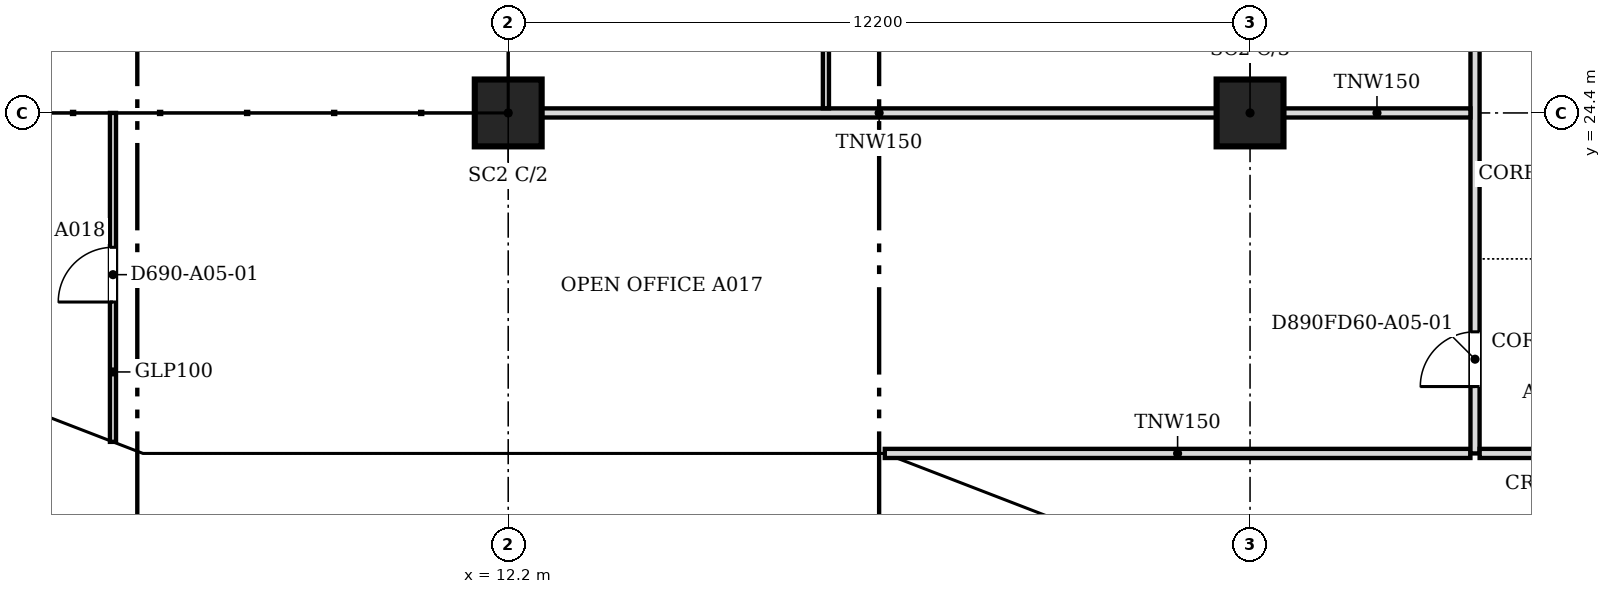
"""IFC4 building model, lengths in metres.
Left out: names, types, materials, properties, quantities, classifications, styles, units other than length and angle.
Written with IfcOpenShell. Run it as: python <this file> out.ifc"""

import sys

from ifc_helpers import new_model, si_unit, direction, frame, frame_2d, origin, origin_2d, place, context, subcontext, project, spatial, polyline, rectangle, outline, extrude, faceted_brep, source, transform, mapped, element, fill, save


model = new_model("IFC4")
c1 = context("Model", 3, precision=1e-05, world=origin(), true_north=direction((0.0, 1.0)))
c2 = subcontext(c1, "Body", "Model", "MODEL_VIEW")
j1 = project(units=[si_unit("LENGTHUNIT", "METRE"), si_unit("PLANEANGLEUNIT", "RADIAN")], contexts=[c1])
p1 = place(None, origin())
s1 = spatial("IfcSite", under=j1, at=p1, CompositionType="ELEMENT")
p2 = place(p1, origin())
s2 = spatial("IfcBuilding", under=s1, at=p2, CompositionType="ELEMENT")
p3 = place(p2, frame((0.0, 0.0, 60.0)))
s3 = spatial("IfcBuildingStorey", under=s2, at=p3, CompositionType="ELEMENT", Elevation=60.0)
for number, where, z_axis, x_axis in (
    (1, (12.2, 24.4, 0.0), (0.0, 0.0, 1.0), (1.0, 0.0, 0.0)),
    (2, (24.4, 24.4, 0.0), (0.0, 0.0, 1.0), (1.0, 0.0, 0.0)),
):
    element("IfcColumn", number, at=place(p3, frame(where, z_axis=z_axis, x_axis=x_axis)), inside=s3, PredefinedType="COLUMN", context=c2, shape_type="SweptSolid", body=[
        extrude(rectangle(XDim=1.1, YDim=1.1, at=origin_2d()), origin(), (0.0, 0.0, 1.0), 3.5),
    ])
m1 = source(origin(), c2, "Body", "Brep", [
    faceted_brep([(0.053, -0.25, 0.0), (3.003, -0.25, 3.8), (0.053, -0.25, 7.6), (0.0, -0.25, 7.532), (0.0, -0.25, 0.068), (0.106, 0.25, 7.532), (2.957, 0.25, 3.86), (2.957, 0.25, 3.74), (0.106, 0.25, 0.068), (3.003, 0.0, 3.8), (0.053, 0.0, 0.0), (0.053, 0.0, 7.6)], [[[0, 1, 2, 3, 4]], [[5, 6, 7, 8]], [[8, 7, 9, 1, 0, 10]], [[6, 5, 11, 2, 1, 9]], [[3, 2, 11]], [[10, 0, 4]], [[8, 10, 4, 3, 11, 5]], [[9, 7, 6]]]),
])
p4 = place(p3, frame((3.344, 19.631, -3.8), z_axis=(0.0, 0.0, 1.0), x_axis=(0.933007896601, -0.359855894603, 0.0)))
e3 = element("IfcWall", 3, at=p4, inside=s3, PredefinedType="SOLIDWALL", context=c2, shape_type="MappedRepresentation", body=[
    mapped(m1, transform((0.0, 0.0, 0.0), scale=1.0)),
])
m2 = source(origin(), c2, "Body", "SweptSolid", [
    extrude(outline(polyline([(0.253, 0.665), (2.687, 3.8), (0.253, 6.935), (0.253, 0.665)])), frame((0.0, 0.26, 0.0), z_axis=(0.0, -1.0, 0.0), x_axis=(1.0, 0.0, 0.0)), (0.0, 0.0, 1.0), 0.52),
])
p5 = place(p4, origin())
e4 = element("IfcOpeningElement", 4, at=p5, cuts=e3, PredefinedType="OPENING", context=c2, shape_type="MappedRepresentation", body=[
    mapped(m2, transform((0.0, 0.0, 0.0), scale=1.0)),
])
m3 = source(origin(), c2, "Body", "Brep", [
    faceted_brep([(3.003, -0.25, 0.0), (6.053, -0.25, 3.8), (3.003, -0.25, 7.6), (0.0, -0.25, 3.8), (0.047, 0.25, 3.859), (3.003, 0.25, 7.6), (6.053, 0.25, 3.8), (3.003, 0.25, 0.0), (0.047, 0.25, 3.741), (0.0, 0.0, 3.8)], [[[0, 1, 2, 3]], [[4, 5, 6, 7, 8]], [[7, 6, 1, 0]], [[6, 5, 2, 1]], [[5, 4, 9, 3, 2]], [[8, 7, 0, 3, 9]], [[8, 9, 4]]]),
])
p6 = place(p3, frame((6.146, 18.55, -3.8), z_axis=(0.0, 0.0, 1.0), x_axis=(1.0, 0.0, 0.0)))
e5 = element("IfcWall", 5, at=p6, inside=s3, PredefinedType="SOLIDWALL", context=c2, shape_type="MappedRepresentation", body=[
    mapped(m3, transform((0.0, 0.0, 0.0), scale=1.0)),
])
m4 = source(origin(), c2, "Body", "SweptSolid", [
    extrude(outline(polyline([(3.005, 0.401), (5.733, 3.8), (3.005, 7.199), (0.319, 3.8), (3.005, 0.401)])), frame((0.0, 0.26, 0.0), z_axis=(0.0, -1.0, 0.0), x_axis=(1.0, 0.0, 0.0)), (0.0, 0.0, 1.0), 0.52),
])
p7 = place(p6, origin())
e6 = element("IfcOpeningElement", 6, at=p7, cuts=e5, PredefinedType="OPENING", context=c2, shape_type="MappedRepresentation", body=[
    mapped(m4, transform((0.0, 0.0, 0.0), scale=1.0)),
])
m5 = source(origin(), c2, "Body", "Brep", [
    faceted_brep([(3.05, -0.25, 0.0), (6.1, -0.25, 3.743), (6.1, -0.25, 3.857), (3.05, -0.25, 7.6), (0.0, -0.25, 3.8), (0.0, 0.25, 3.8), (3.05, 0.25, 7.6), (6.146, 0.25, 3.8), (3.05, 0.25, 0.0), (6.146, -0.0, 3.8)], [[[0, 1, 2, 3, 4]], [[5, 6, 7, 8]], [[8, 7, 9, 1, 0]], [[7, 6, 3, 2, 9]], [[6, 5, 4, 3]], [[5, 8, 0, 4]], [[1, 9, 2]]]),
])
p8 = place(p3, frame((12.2, 18.55, -3.8), z_axis=(0.0, 0.0, 1.0), x_axis=(1.0, 0.0, 0.0)))
e7 = element("IfcWall", 7, at=p8, inside=s3, PredefinedType="SOLIDWALL", context=c2, shape_type="MappedRepresentation", body=[
    mapped(m5, transform((0.0, 0.0, 0.0), scale=1.0)),
])
m6 = source(origin(), c2, "Body", "SweptSolid", [
    extrude(outline(polyline([(3.052, 0.398), (5.824, 3.8), (3.052, 7.202), (0.321, 3.8), (3.052, 0.398)])), frame((0.0, 0.26, 0.0), z_axis=(0.0, -1.0, 0.0), x_axis=(1.0, 0.0, 0.0)), (0.0, 0.0, 1.0), 0.52),
])
p9 = place(p8, origin())
e8 = element("IfcOpeningElement", 8, at=p9, cuts=e7, PredefinedType="OPENING", context=c2, shape_type="MappedRepresentation", body=[
    mapped(m6, transform((0.0, 0.0, 0.0), scale=1.0)),
])
m7 = source(origin(), c2, "Body", "Brep", [
    faceted_brep([(3.096, -0.25, 7.536), (0.047, -0.25, 3.856), (0.047, -0.25, 3.744), (3.096, -0.25, 0.064), (0.0, 0.25, 3.8), (3.149, 0.25, 7.6), (3.202, 0.25, 7.536), (3.202, 0.25, 0.064), (3.149, 0.25, 0.0), (3.149, -0.0, 0.0), (3.149, -0.0, 7.6), (0.0, 0.0, 3.8)], [[[0, 1, 2, 3]], [[4, 5, 6, 7, 8]], [[8, 7, 9]], [[6, 5, 10]], [[5, 4, 11, 1, 0, 10]], [[4, 8, 9, 3, 2, 11]], [[11, 2, 1]], [[3, 9, 7, 6, 10, 0]]]),
])
p10 = place(p3, frame((18.346, 18.55, -3.8), z_axis=(0.0, 0.0, 1.0), x_axis=(0.932985567668, -0.359913782069, 0.0)))
e9 = element("IfcWall", 9, at=p10, inside=s3, PredefinedType="SOLIDWALL", context=c2, shape_type="MappedRepresentation", body=[
    mapped(m7, transform((0.0, 0.0, 0.0), scale=1.0)),
])
m8 = source(origin(), c2, "Body", "SweptSolid", [
    extrude(outline(polyline([(2.949, 6.967), (0.325, 3.8), (2.949, 0.633), (2.949, 6.967)])), frame((0.0, 0.26, 0.0), z_axis=(0.0, -1.0, 0.0), x_axis=(1.0, 0.0, 0.0)), (0.0, 0.0, 1.0), 0.52),
])
p11 = place(p10, origin())
e10 = element("IfcOpeningElement", 10, at=p11, cuts=e9, PredefinedType="OPENING", context=c2, shape_type="MappedRepresentation", body=[
    mapped(m8, transform((0.0, 0.0, 0.0), scale=1.0)),
])
m9 = source(origin(), c2, "Body", "Brep", [
    faceted_brep([(2.95, -0.25, 0.0), (2.997, -0.25, 0.059), (2.997, -0.25, 3.8), (0.0, -0.25, 3.8), (0.053, 0.25, 3.8), (2.904, 0.25, 3.8), (2.904, 0.25, 0.06), (0.053, 0.25, 3.732), (2.95, 0.0, 0.0), (0.0, 0.0, 3.8)], [[[0, 1, 2, 3]], [[4, 5, 6, 7]], [[1, 0, 8]], [[5, 4, 9, 3, 2]], [[7, 6, 8, 0, 3, 9]], [[7, 9, 4]], [[1, 8, 6, 5, 2]]]),
])
p12 = place(p3, frame((3.394, 19.612, 0.0), z_axis=(0.0, 0.0, 1.0), x_axis=(0.932990326376, -0.359901446078, 0.0)))
e11 = element("IfcWall", 11, at=p12, inside=s3, PredefinedType="SOLIDWALL", context=c2, shape_type="MappedRepresentation", body=[
    mapped(m9, transform((0.0, 0.0, 0.0), scale=1.0)),
])
m10 = source(origin(), c2, "Body", "SweptSolid", [
    extrude(outline(polyline([(2.75, 3.55), (0.511, 3.55), (2.75, 0.665), (2.75, 3.55)])), frame((0.0, 0.26, 0.0), z_axis=(0.0, -1.0, 0.0), x_axis=(1.0, 0.0, 0.0)), (0.0, 0.0, 1.0), 0.52),
])
p13 = place(p12, origin())
e12 = element("IfcOpeningElement", 12, at=p13, cuts=e11, PredefinedType="OPENING", context=c2, shape_type="MappedRepresentation", body=[
    mapped(m10, transform((0.0, 0.0, 0.0), scale=1.0)),
])
m11 = source(origin(), c2, "Body", "Brep", [
    faceted_brep([(0.047, -0.25, 0.0), (3.05, -0.25, 3.8), (0.0, -0.25, 3.8), (0.0, -0.25, 0.06), (0.093, 0.25, 3.8), (3.05, 0.25, 3.8), (0.093, 0.25, 0.059), (0.047, 0.0, 0.0)], [[[0, 1, 2, 3]], [[4, 5, 6]], [[6, 5, 1, 0, 7]], [[5, 4, 2, 1]], [[7, 0, 3]], [[6, 7, 3, 2, 4]]]),
])
p14 = place(p3, frame((6.1, 18.55, 0.0), z_axis=(0.0, 0.0, 1.0), x_axis=(1.0, 0.0, 0.0)))
e13 = element("IfcWall", 13, at=p14, inside=s3, PredefinedType="SOLIDWALL", context=c2, shape_type="MappedRepresentation", body=[
    mapped(m11, transform((0.0, 0.0, 0.0), scale=1.0)),
])
m12 = source(origin(), c2, "Body", "SweptSolid", [
    extrude(outline(polyline([(0.247, 0.656), (2.534, 3.55), (0.247, 3.55), (0.247, 0.656)])), frame((0.0, 0.26, 0.0), z_axis=(0.0, -1.0, 0.0), x_axis=(1.0, 0.0, 0.0)), (0.0, 0.0, 1.0), 0.52),
])
p15 = place(p14, origin())
e14 = element("IfcOpeningElement", 14, at=p15, cuts=e13, PredefinedType="OPENING", context=c2, shape_type="MappedRepresentation", body=[
    mapped(m12, transform((0.0, 0.0, 0.0), scale=1.0)),
])
m13 = source(origin(), c2, "Body", "SweptSolid", [
    extrude(outline(polyline([(3.05, 0.0), (6.1, 3.8), (0.0, 3.8), (3.05, 0.0)])), frame((0.0, 0.25, 0.0), z_axis=(0.0, -1.0, 0.0), x_axis=(1.0, 0.0, 0.0)), (0.0, 0.0, 1.0), 0.5),
])
p16 = place(p3, frame((9.15, 18.55, 0.0), z_axis=(0.0, 0.0, 1.0), x_axis=(1.0, 0.0, 0.0)))
e15 = element("IfcWall", 15, at=p16, inside=s3, PredefinedType="SOLIDWALL", context=c2, shape_type="MappedRepresentation", body=[
    mapped(m13, transform((0.0, 0.0, 0.0), scale=1.0)),
])
m14 = source(origin(), c2, "Body", "SweptSolid", [
    extrude(outline(polyline([(3.05, 0.399), (5.579, 3.55), (0.521, 3.55), (3.05, 0.399)])), frame((0.0, 0.26, 0.0), z_axis=(0.0, -1.0, 0.0), x_axis=(1.0, 0.0, 0.0)), (0.0, 0.0, 1.0), 0.52),
])
p17 = place(p16, origin())
e16 = element("IfcOpeningElement", 16, at=p17, cuts=e15, PredefinedType="OPENING", context=c2, shape_type="MappedRepresentation", body=[
    mapped(m14, transform((0.0, 0.0, 0.0), scale=1.0)),
])
m15 = source(origin(), c2, "Body", "Brep", [
    faceted_brep([(3.05, -0.25, 3.8), (0.0, -0.25, 3.8), (3.05, -0.25, 0.057), (0.0, 0.25, 3.8), (3.143, 0.25, 3.8), (3.143, 0.25, 0.056), (3.096, 0.25, 0.0), (3.096, -0.0, 0.0)], [[[0, 1, 2]], [[3, 4, 5, 6]], [[6, 5, 7]], [[4, 3, 1, 0]], [[3, 6, 7, 2, 1]], [[2, 7, 5, 4, 0]]]),
])
p18 = place(p3, frame((15.25, 18.55, 0.0), z_axis=(0.0, 0.0, 1.0), x_axis=(1.0, 0.0, 0.0)))
e17 = element("IfcWall", 17, at=p18, inside=s3, PredefinedType="SOLIDWALL", context=c2, shape_type="MappedRepresentation", body=[
    mapped(m15, transform((0.0, 0.0, 0.0), scale=1.0)),
])
m16 = source(origin(), c2, "Body", "SweptSolid", [
    extrude(outline(polyline([(2.896, 3.55), (0.526, 3.55), (2.896, 0.641), (2.896, 3.55)])), frame((0.0, 0.26, 0.0), z_axis=(0.0, -1.0, 0.0), x_axis=(1.0, 0.0, 0.0)), (0.0, 0.0, 1.0), 0.52),
])
p19 = place(p18, origin())
e18 = element("IfcOpeningElement", 18, at=p19, cuts=e17, PredefinedType="OPENING", context=c2, shape_type="MappedRepresentation", body=[
    mapped(m16, transform((0.0, 0.0, 0.0), scale=1.0)),
])
m17 = source(origin(), c2, "Body", "Brep", [
    faceted_brep([(0.093, -0.25, 0.056), (3.143, -0.25, 3.736), (3.143, -0.25, 3.8), (0.093, -0.25, 3.8), (0.0, 0.25, 3.8), (3.196, 0.25, 3.8), (0.047, 0.25, 0.0), (0.0, 0.25, 0.057), (3.196, -0.0, 3.8), (0.047, 0.0, 0.0)], [[[0, 1, 2, 3]], [[4, 5, 6, 7]], [[6, 5, 8, 1, 0, 9]], [[5, 4, 3, 2, 8]], [[7, 6, 9]], [[7, 9, 0, 3, 4]], [[1, 8, 2]]]),
])
p20 = place(p3, frame((18.303, 18.567, 0.0), z_axis=(0.0, 0.0, 1.0), x_axis=(0.932978940178, -0.359930961693, 0.0)))
e19 = element("IfcWall", 19, at=p20, inside=s3, PredefinedType="SOLIDWALL", context=c2, shape_type="MappedRepresentation", body=[
    mapped(m17, transform((0.0, 0.0, 0.0), scale=1.0)),
])
m18 = source(origin(), c2, "Body", "SweptSolid", [
    extrude(outline(polyline([(0.247, 0.633), (2.664, 3.55), (0.247, 3.55), (0.247, 0.633)])), frame((0.0, 0.26, 0.0), z_axis=(0.0, -1.0, 0.0), x_axis=(1.0, 0.0, 0.0)), (0.0, 0.0, 1.0), 0.52),
])
p21 = place(p20, origin())
e20 = element("IfcOpeningElement", 20, at=p21, cuts=e19, PredefinedType="OPENING", context=c2, shape_type="MappedRepresentation", body=[
    mapped(m18, transform((0.0, 0.0, 0.0), scale=1.0)),
])
p22 = place(p3, frame((18.393, 18.8, 0.0), z_axis=(0.0, 0.0, 1.0), x_axis=(1.0, 0.0, 0.0)))
e21 = element("IfcWall", 21, at=p22, inside=s3, PredefinedType="PARTITIONING", context=c2, shape_type="SweptSolid", body=[
    extrude(rectangle(XDim=9.631, YDim=0.15, at=frame_2d((4.815, 0.0))), origin(), (0.0, 0.0, 1.0), 2.888),
])
p23 = place(p3, frame((28.1, 18.8, 0.0), z_axis=(0.0, 0.0, 1.0), x_axis=(0.0, 1.0, 0.0)))
e22 = element("IfcWall", 22, at=p23, inside=s3, PredefinedType="PARTITIONING", context=c2, shape_type="SweptSolid", body=[
    extrude(rectangle(XDim=26.5, YDim=0.15, at=frame_2d((13.25, 0.0))), origin(), (0.0, 0.0, 1.0), 2.888),
])
m19 = source(origin(), c2, "Body", "SweptSolid", [
    extrude(rectangle(XDim=0.9, YDim=2.1, at=frame_2d((0.45, 1.05))), frame((0.0, 0.085, 0.0), z_axis=(0.0, -1.0, 0.0), x_axis=(1.0, 0.0, 0.0)), (0.0, 0.0, 1.0), 0.17),
])
p24 = place(p23, frame((1.1, 0.0, 0.0)))
e23 = element("IfcOpeningElement", 23, at=p24, cuts=e22, PredefinedType="OPENING", context=c2, shape_type="MappedRepresentation", body=[
    mapped(m19, transform((0.0, 0.0, 0.0), scale=1.0)),
])
m20 = source(origin(), c2, "Body", "SweptSolid", [
    extrude(rectangle(XDim=1.0, YDim=2.1, at=frame_2d((0.5, 1.05))), frame((0.0, 0.085, 0.0), z_axis=(0.0, -1.0, 0.0), x_axis=(1.0, 0.0, 0.0)), (0.0, 0.0, 1.0), 0.17),
])
p25 = place(p23, frame((23.151, 0.0, 0.0)))
e24 = element("IfcOpeningElement", 24, at=p25, cuts=e22, PredefinedType="OPENING", context=c2, shape_type="MappedRepresentation", body=[
    mapped(m20, transform((0.0, 0.0, 0.0), scale=1.0)),
])
p26 = place(p23, frame((8.2, 0.0, 0.0)))
e25 = element("IfcOpeningElement", 25, at=p26, cuts=e22, PredefinedType="OPENING", context=c2, shape_type="MappedRepresentation", body=[
    mapped(m19, transform((0.0, 0.0, 0.0), scale=1.0)),
])
p27 = place(p23, frame((15.8, 0.0, 0.0)))
e26 = element("IfcOpeningElement", 26, at=p27, cuts=e22, PredefinedType="OPENING", context=c2, shape_type="MappedRepresentation", body=[
    mapped(m19, transform((0.0, 0.0, 0.0), scale=1.0)),
])
p28 = place(p3, frame((28.176, 18.8, 0.0), z_axis=(0.0, 0.0, 1.0), x_axis=(1.0, 0.0, 0.0)))
e27 = element("IfcWall", 27, at=p28, inside=s3, PredefinedType="PARTITIONING", context=c2, shape_type="SweptSolid", body=[
    extrude(rectangle(XDim=2.248, YDim=0.15, at=frame_2d((1.124, 0.0))), origin(), (0.0, 0.0, 1.0), 2.888),
])
p29 = place(p3, frame((5.7, 18.99, 0.0), z_axis=(0.0, 0.0, 1.0), x_axis=(0.0, 1.0, 0.0)))
e28 = element("IfcWall", 28, at=p29, inside=s3, PredefinedType="PARTITIONING", context=c2, shape_type="SweptSolid", body=[
    extrude(rectangle(XDim=5.41, YDim=0.1, at=frame_2d((2.705, 0.0))), origin(), (0.0, 0.0, 1.0), 2.888),
])
m21 = source(origin(), c2, "Body", "SweptSolid", [
    extrude(rectangle(XDim=0.9, YDim=2.1, at=frame_2d((0.45, 1.05))), frame((0.0, 0.06, 0.0), z_axis=(0.0, -1.0, 0.0), x_axis=(1.0, 0.0, 0.0)), (0.0, 0.0, 1.0), 0.12),
])
p30 = place(p29, frame((2.3, 0.0, 0.0)))
e29 = element("IfcOpeningElement", 29, at=p30, cuts=e28, PredefinedType="OPENING", context=c2, shape_type="MappedRepresentation", body=[
    mapped(m21, transform((0.0, 0.0, 0.0), scale=1.0)),
])
p31 = place(p3, frame((12.751, 24.4, 0.0), z_axis=(0.0, 0.0, 1.0), x_axis=(1.0, 0.0, 0.0)))
e30 = element("IfcWall", 30, at=p31, inside=s3, PredefinedType="PARTITIONING", context=c2, shape_type="SweptSolid", body=[
    extrude(rectangle(XDim=11.098, YDim=0.15, at=frame_2d((5.549, 0.0))), origin(), (0.0, 0.0, 1.0), 2.888),
])
p32 = place(p3, frame((24.951, 24.4, 0.0), z_axis=(0.0, 0.0, 1.0), x_axis=(1.0, 0.0, 0.0)))
e31 = element("IfcWall", 31, at=p32, inside=s3, PredefinedType="PARTITIONING", context=c2, shape_type="SweptSolid", body=[
    extrude(rectangle(XDim=3.073, YDim=0.15, at=frame_2d((1.537, 0.0))), origin(), (0.0, 0.0, 1.0), 2.888),
])
p33 = place(p3, frame((17.425, 24.476, 0.0), z_axis=(0.0, 0.0, 1.0), x_axis=(0.0, 1.0, 0.0)))
e32 = element("IfcWall", 32, at=p33, inside=s3, PredefinedType="PARTITIONING", context=c2, shape_type="SweptSolid", body=[
    extrude(rectangle(XDim=5.948, YDim=0.1, at=frame_2d((2.974, 0.0))), origin(), (0.0, 0.0, 1.0), 2.888),
])
p34 = place(p33, frame((2.5, 0.0, 0.0)))
e33 = element("IfcOpeningElement", 33, at=p34, cuts=e32, PredefinedType="OPENING", context=c2, shape_type="MappedRepresentation", body=[
    mapped(m21, transform((0.0, 0.0, 0.0), scale=1.0)),
])
m22 = source(origin(), c2, "Body", "SweptSolid", [
    extrude(rectangle(XDim=0.9, YDim=2.1, at=frame_2d((0.45, 1.05))), frame((0.0, 0.025, 0.0), z_axis=(0.0, -1.0, 0.0), x_axis=(1.0, 0.0, 0.0)), (0.0, 0.0, 1.0), 0.05),
])
p35 = place(p24, origin())
e34 = element("IfcDoor", 34, at=p35, inside=s3, OperationType="SINGLE_SWING_LEFT", PredefinedType="DOOR", context=c2, shape_type="MappedRepresentation", body=[
    mapped(m22, transform((0.0, 0.0, 0.0), scale=1.0)),
])
fill(e23, e34)
p36 = place(p30, origin())
e35 = element("IfcDoor", 35, at=p36, inside=s3, OperationType="SINGLE_SWING_LEFT", PredefinedType="DOOR", context=c2, shape_type="MappedRepresentation", body=[
    mapped(m22, transform((0.0, 0.0, 0.0), scale=1.0)),
])
fill(e29, e35)
save(model, sys.argv[1])
